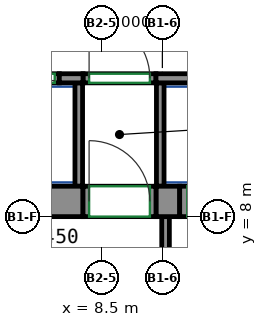
"""IFC4 building model, lengths in metres.
Left out: names, types, materials, properties, quantities, classifications, styles, units other than length and angle.
Written with IfcOpenShell. Run it as: python <this file> out.ifc"""

import sys

from ifc_helpers import new_model, si_unit, direction, frame, frame_2d, origin, place, context, subcontext, project, spatial, rectangle, extrude, source, transform, mapped, element, fill, save


model = new_model("IFC4")
c1 = context("Model", 3, precision=1e-05, world=origin(), true_north=direction((0.0, 1.0)))
c2 = subcontext(c1, "Body", "Model", "MODEL_VIEW")
j1 = project(units=[si_unit("LENGTHUNIT", "METRE"), si_unit("PLANEANGLEUNIT", "RADIAN")], contexts=[c1])
p1 = place(None, origin())
s1 = spatial("IfcSite", under=j1, at=p1, CompositionType="ELEMENT")
p2 = place(p1, origin())
s2 = spatial("IfcBuilding", under=s1, at=p2, CompositionType="ELEMENT")
p3 = place(p2, frame((0.0, 0.0, 18.0)))
s3 = spatial("IfcBuildingStorey", under=s2, at=p3, CompositionType="ELEMENT", Elevation=18.0)
m1 = source(origin(), c2, "Body", "SweptSolid", [
    extrude(rectangle(XDim=14.18, YDim=1.0, at=frame_2d((7.09, 0.0))), origin(), (0.0, 0.0, 1.0), 4.1),
])
p4 = place(p3, frame((-6.29, 8.5, 0.0), z_axis=(0.0, 0.0, 1.0), x_axis=(1.0, 0.0, 0.0)))
e1 = element("IfcWall", 1, at=p4, inside=s3, PredefinedType="SHEAR", context=c2, shape_type="MappedRepresentation", body=[
    mapped(m1, transform((0.0, 0.0, 0.0))),
])
m2 = source(origin(), c2, "Body", "SweptSolid", [
    extrude(rectangle(XDim=0.78, YDim=1.0, at=frame_2d((0.39, 0.0))), origin(), (0.0, 0.0, 1.0), 4.1),
])
p5 = place(p3, frame((10.29, 8.5, 0.0), z_axis=(0.0, 0.0, 1.0), x_axis=(1.0, 0.0, 0.0)))
e2 = element("IfcWall", 2, at=p5, inside=s3, PredefinedType="SHEAR", context=c2, shape_type="MappedRepresentation", body=[
    mapped(m2, transform((0.0, 0.0, 0.0))),
])
m3 = source(origin(), c2, "Body", "SweptSolid", [
    extrude(rectangle(XDim=0.78, YDim=0.3, at=frame_2d((0.39, 0.0))), origin(), (0.0, 0.0, 1.0), 4.1),
])
p6 = place(p3, frame((7.11, 12.55, 0.0), z_axis=(0.0, 0.0, 1.0), x_axis=(1.0, 0.0, 0.0)))
e3 = element("IfcWall", 3, at=p6, inside=s3, PredefinedType="SHEAR", context=c2, shape_type="MappedRepresentation", body=[
    mapped(m3, transform((0.0, 0.0, 0.0))),
])
m4 = source(origin(), c2, "Body", "SweptSolid", [
    extrude(rectangle(XDim=2.82, YDim=0.3, at=frame_2d((1.41, 0.0))), origin(), (0.0, 0.0, 1.0), 4.1),
])
p7 = place(p3, frame((10.29, 12.55, 0.0), z_axis=(0.0, 0.0, 1.0), x_axis=(1.0, 0.0, 0.0)))
e4 = element("IfcWall", 4, at=p7, inside=s3, PredefinedType="SHEAR", context=c2, shape_type="MappedRepresentation", body=[
    mapped(m4, transform((0.0, 0.0, 0.0))),
])
m5 = source(origin(), c2, "Body", "SweptSolid", [
    extrude(rectangle(XDim=1.4, YDim=0.3, at=frame_2d((0.7, 0.0))), origin(), (0.0, 0.0, 1.0), 4.1),
])
p8 = place(p3, frame((5.71, 12.55, 0.0), z_axis=(0.0, 0.0, 1.0), x_axis=(1.0, 0.0, 0.0)))
e5 = element("IfcWall", 5, at=p8, inside=s3, PredefinedType="PARTITIONING", context=c2, shape_type="MappedRepresentation", body=[
    mapped(m5, transform((0.0, 0.0, 0.0))),
])
p9 = place(p8, frame((0.15, 0.0, 0.0)))
e6 = element("IfcOpeningElement", 6, at=p9, cuts=e5, PredefinedType="OPENING", context=c2, shape_type="SweptSolid", body=[
    extrude(rectangle(XDim=1.1, YDim=2.1, at=frame_2d((0.55, 1.05))), frame((0.0, 0.16, 0.0), z_axis=(0.0, -1.0, 0.0), x_axis=(1.0, 0.0, 0.0)), (0.0, 0.0, 1.0), 0.32),
])
m6 = source(origin(), c2, "Body", "SweptSolid", [
    extrude(rectangle(XDim=2.4, YDim=0.3, at=frame_2d((1.2, 0.0))), origin(), (0.0, 0.0, 1.0), 4.1),
])
p10 = place(p3, frame((7.89, 12.55, 0.0), z_axis=(0.0, 0.0, 1.0), x_axis=(1.0, 0.0, 0.0)))
e7 = element("IfcWall", 7, at=p10, inside=s3, PredefinedType="PARTITIONING", context=c2, shape_type="MappedRepresentation", body=[
    mapped(m6, transform((0.0, 0.0, 0.0))),
])
p11 = place(p10, frame((0.2, 0.0, 0.0)))
e8 = element("IfcOpeningElement", 8, at=p11, cuts=e7, PredefinedType="OPENING", context=c2, shape_type="SweptSolid", body=[
    extrude(rectangle(XDim=2.0, YDim=2.1, at=frame_2d((1.0, 1.05))), frame((0.0, 0.16, 0.0), z_axis=(0.0, -1.0, 0.0), x_axis=(1.0, 0.0, 0.0)), (0.0, 0.0, 1.0), 0.32),
])
m7 = source(origin(), c2, "Body", "SweptSolid", [
    extrude(rectangle(XDim=2.65, YDim=0.25, at=frame_2d((1.325, 0.0))), origin(), (0.0, 0.0, 1.0), 4.1),
])
p12 = place(p3, frame((10.605, 5.35, 0.0), z_axis=(0.0, 0.0, 1.0), x_axis=(0.0, 1.0, 0.0)))
e9 = element("IfcWall", 9, at=p12, inside=s3, PredefinedType="PARTITIONING", context=c2, shape_type="MappedRepresentation", body=[
    mapped(m7, transform((0.0, 0.0, 0.0))),
])
m8 = source(origin(), c2, "Body", "SweptSolid", [
    extrude(rectangle(XDim=3.4, YDim=0.25, at=frame_2d((1.7, 0.0))), origin(), (0.0, 0.0, 1.0), 4.1),
])
for number, where, z_axis, x_axis in (
    (10, (10.43, 9.0, 0.0), (0.0, 0.0, 1.0), (0.0, 1.0, 0.0)),
    (11, (7.75, 9.0, 0.0), (0.0, 0.0, 1.0), (0.0, 1.0, 0.0)),
):
    element("IfcWall", number, at=place(p3, frame(where, z_axis=z_axis, x_axis=x_axis)), inside=s3, PredefinedType="PARTITIONING", context=c2, shape_type="MappedRepresentation", body=[
        mapped(m8, transform((0.0, 0.0, 0.0))),
    ])
m9 = source(origin(), c2, "Body", "SweptSolid", [
    extrude(rectangle(XDim=2.4, YDim=1.0, at=frame_2d((1.2, 0.0))), origin(), (0.0, 0.0, 1.0), 2.7),
])
p13 = place(p3, frame((7.89, 8.5, 0.0), z_axis=(0.0, 0.0, 1.0), x_axis=(1.0, 0.0, 0.0)))
e12 = element("IfcWall", 12, at=p13, inside=s3, PredefinedType="PARTITIONING", context=c2, shape_type="MappedRepresentation", body=[
    mapped(m9, transform((0.0, 0.0, 0.0))),
])
p14 = place(p13, frame((0.2, 0.0, 0.0)))
e13 = element("IfcOpeningElement", 13, at=p14, cuts=e12, PredefinedType="OPENING", context=c2, shape_type="SweptSolid", body=[
    extrude(rectangle(XDim=2.0, YDim=2.1, at=frame_2d((1.0, 1.05))), frame((0.0, 0.51, 0.0), z_axis=(0.0, -1.0, 0.0), x_axis=(1.0, 0.0, 0.0)), (0.0, 0.0, 1.0), 1.02),
])
m10 = source(origin(), c2, "Body", "SweptSolid", [
    extrude(rectangle(XDim=1.4, YDim=1.0, at=frame_2d((0.7, 0.0))), origin(), (0.0, 0.0, 1.0), 2.7),
])
p15 = place(p3, frame((11.07, 8.5, 0.0), z_axis=(0.0, 0.0, 1.0), x_axis=(1.0, 0.0, 0.0)))
e14 = element("IfcWall", 14, at=p15, inside=s3, PredefinedType="PARTITIONING", context=c2, shape_type="MappedRepresentation", body=[
    mapped(m10, transform((0.0, 0.0, 0.0))),
])
p16 = place(p15, frame((0.25, 0.0, 0.0)))
e15 = element("IfcOpeningElement", 15, at=p16, cuts=e14, PredefinedType="OPENING", context=c2, shape_type="SweptSolid", body=[
    extrude(rectangle(XDim=0.9, YDim=2.1, at=frame_2d((0.45, 1.05))), frame((0.0, 0.51, 0.0), z_axis=(0.0, -1.0, 0.0), x_axis=(1.0, 0.0, 0.0)), (0.0, 0.0, 1.0), 1.02),
])
p17 = place(p11, origin())
e16 = element("IfcDoor", 16, at=p17, inside=s3, OperationType="DOUBLE_DOOR_SINGLE_SWING", PredefinedType="DOOR", context=c2, shape_type="SweptSolid", body=[
    extrude(rectangle(XDim=2.0, YDim=2.1, at=frame_2d((1.0, 1.05))), frame((0.0, 0.025, 0.0), z_axis=(0.0, -1.0, 0.0), x_axis=(1.0, 0.0, 0.0)), (0.0, 0.0, 1.0), 0.05),
])
fill(e8, e16)
p18 = place(p14, origin())
e17 = element("IfcDoor", 17, at=p18, inside=s3, OperationType="DOUBLE_DOOR_SINGLE_SWING", PredefinedType="DOOR", context=c2, shape_type="SweptSolid", body=[
    extrude(rectangle(XDim=2.0, YDim=2.1, at=frame_2d((1.0, 1.05))), frame((0.0, 0.405, 0.0), z_axis=(0.0, -1.0, 0.0), x_axis=(1.0, 0.0, 0.0)), (0.0, 0.0, 1.0), 0.05),
])
fill(e13, e17)
p19 = place(p9, origin())
e18 = element("IfcDoor", 18, at=p19, inside=s3, OperationType="DOUBLE_DOOR_SLIDING", PredefinedType="DOOR", context=c2, shape_type="SweptSolid", body=[
    extrude(rectangle(XDim=1.1, YDim=2.1, at=frame_2d((0.55, 1.05))), frame((0.0, 0.025, 0.0), z_axis=(0.0, -1.0, 0.0), x_axis=(1.0, 0.0, 0.0)), (0.0, 0.0, 1.0), 0.05),
])
fill(e6, e18)
save(model, sys.argv[1])
